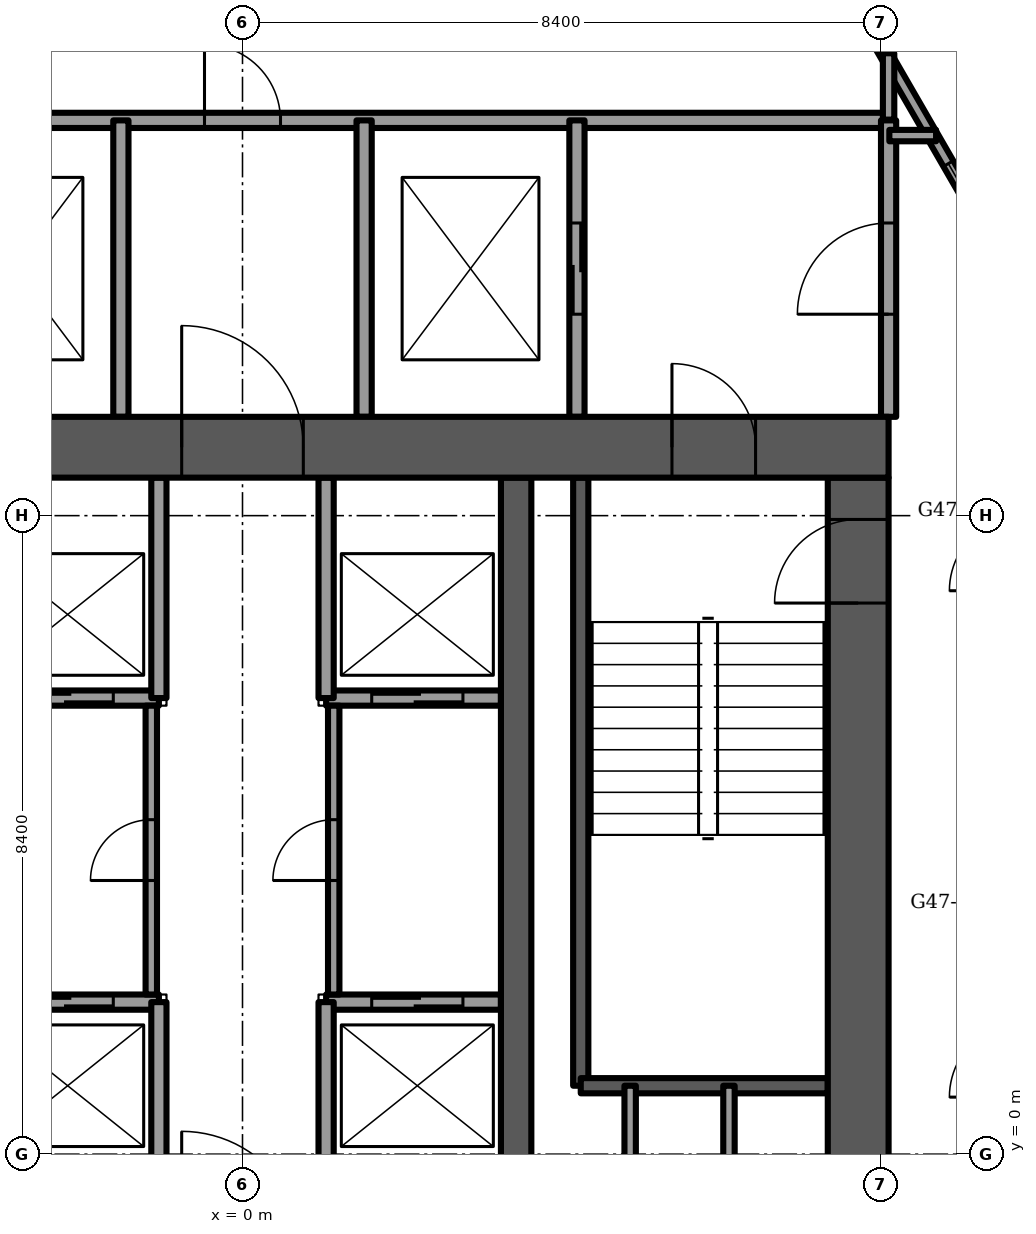
"""IFC4 building model, lengths in metres.
Left out: names, types, materials, properties, quantities, classifications, styles, units other than length and angle.
Written with IfcOpenShell. Run it as: python <this file> out.ifc"""

import sys

from ifc_helpers import new_model, si_unit, direction, frame, frame_2d, origin, place, context, subcontext, project, spatial, rectangle, extrude, element, fill, save


model = new_model("IFC4")
c1 = context("Model", 3, precision=1e-05, world=origin(), true_north=direction((0.0, 1.0)))
c2 = subcontext(c1, "Body", "Model", "MODEL_VIEW")
j1 = project(units=[si_unit("LENGTHUNIT", "METRE"), si_unit("PLANEANGLEUNIT", "RADIAN")], contexts=[c1])
p1 = place(None, origin())
s1 = spatial("IfcSite", under=j1, at=p1, CompositionType="ELEMENT")
p2 = place(p1, origin())
s2 = spatial("IfcBuilding", under=s1, at=p2, CompositionType="ELEMENT")
p3 = place(p2, frame((0.0, 0.0, 190.75)))
s3 = spatial("IfcBuildingStorey", under=s2, at=p3, CompositionType="ELEMENT", Elevation=190.75)
p4 = place(p3, frame((-8.5, 9.3, -0.3), z_axis=(0.0, 0.0, 1.0), x_axis=(1.0, 0.0, 0.0)))
e1 = element("IfcWall", 1, at=p4, inside=s3, PredefinedType="SHEAR", context=c2, shape_type="SweptSolid", body=[
    extrude(rectangle(XDim=17.0, YDim=0.8, at=frame_2d((8.5, 0.0))), origin(), (0.0, 0.0, 1.0), 3.75),
])
p5 = place(p4, frame((7.7, 0.0, 0.0)))
e2 = element("IfcOpeningElement", 2, at=p5, cuts=e1, PredefinedType="OPENING", context=c2, shape_type="SweptSolid", body=[
    extrude(rectangle(XDim=1.6, YDim=2.1, at=frame_2d((0.8, 1.05))), frame((0.0, 0.4, 0.0), z_axis=(0.0, -1.0, 0.0), x_axis=(1.0, 0.0, 0.0)), (0.0, 0.0, 1.0), 0.8),
])
p6 = place(p4, frame((1.75, 0.0, 0.0)))
e3 = element("IfcOpeningElement", 3, at=p6, cuts=e1, PredefinedType="OPENING", context=c2, shape_type="SweptSolid", body=[
    extrude(rectangle(XDim=1.1, YDim=2.1, at=frame_2d((0.55, 1.05))), frame((0.0, 0.4, 0.0), z_axis=(0.0, -1.0, 0.0), x_axis=(1.0, 0.0, 0.0)), (0.0, 0.0, 1.0), 0.8),
])
p7 = place(p4, frame((14.15, 0.0, 0.0)))
e4 = element("IfcOpeningElement", 4, at=p7, cuts=e1, PredefinedType="OPENING", context=c2, shape_type="SweptSolid", body=[
    extrude(rectangle(XDim=1.1, YDim=2.1, at=frame_2d((0.55, 1.05))), frame((0.0, 0.4, 0.0), z_axis=(0.0, -1.0, 0.0), x_axis=(1.0, 0.0, 0.0)), (0.0, 0.0, 1.0), 0.8),
])
p8 = place(p3, frame((8.1, -0.9, -0.3), z_axis=(0.0, 0.0, 1.0), x_axis=(0.0, 1.0, 0.0)))
e5 = element("IfcWall", 5, at=p8, inside=s3, PredefinedType="SHEAR", context=c2, shape_type="SweptSolid", body=[
    extrude(rectangle(XDim=9.8, YDim=0.8, at=frame_2d((4.9, 0.0))), origin(), (0.0, 0.0, 1.0), 3.75),
])
p9 = place(p8, frame((8.15, 0.0, 0.0)))
e6 = element("IfcOpeningElement", 6, at=p9, cuts=e5, PredefinedType="OPENING", context=c2, shape_type="SweptSolid", body=[
    extrude(rectangle(XDim=1.1, YDim=2.1, at=frame_2d((0.55, 1.05))), frame((0.0, 0.4, 0.0), z_axis=(0.0, -1.0, 0.0), x_axis=(1.0, 0.0, 0.0)), (0.0, 0.0, 1.0), 0.8),
])
p10 = place(p3, frame((3.6, -0.9, -0.3), z_axis=(0.0, 0.0, 1.0), x_axis=(0.0, 1.0, 0.0)))
e7 = element("IfcWall", 7, at=p10, inside=s3, PredefinedType="SHEAR", context=c2, shape_type="SweptSolid", body=[
    extrude(rectangle(XDim=9.8, YDim=0.4, at=frame_2d((4.9, 0.0))), origin(), (0.0, 0.0, 1.0), 3.75),
])
p11 = place(p3, frame((17.003, -0.335, 0.0), z_axis=(0.0, 0.0, 1.0), x_axis=(-0.50000659594, 0.866021595583, 0.0)))
e8 = element("IfcWall", 8, at=p11, inside=s3, PredefinedType="SOLIDWALL", context=c2, shape_type="SweptSolid", body=[
    extrude(rectangle(XDim=20.354, YDim=0.15, at=frame_2d((10.177, 0.0))), origin(), (0.0, 0.0, 1.0), 3.45),
])
p12 = place(p11, frame((1.288, 0.0, 0.15)))
e9 = element("IfcOpeningElement", 9, at=p12, cuts=e8, PredefinedType="OPENING", context=c2, shape_type="SweptSolid", body=[
    extrude(rectangle(XDim=0.9, YDim=2.85, at=frame_2d((0.45, 1.425))), frame((0.0, 0.075, 0.0), z_axis=(0.0, -1.0, 0.0), x_axis=(1.0, 0.0, 0.0)), (0.0, 0.0, 1.0), 0.15),
])
p13 = place(p11, frame((2.892, 0.0, 0.0)))
e10 = element("IfcOpeningElement", 10, at=p13, cuts=e8, PredefinedType="OPENING", context=c2, shape_type="SweptSolid", body=[
    extrude(rectangle(XDim=1.4, YDim=2.4, at=frame_2d((0.7, 1.2))), frame((0.0, 0.075, 0.0), z_axis=(0.0, -1.0, 0.0), x_axis=(1.0, 0.0, 0.0)), (0.0, 0.0, 1.0), 0.15),
])
p14 = place(p11, frame((6.138, 0.0, 0.15)))
e11 = element("IfcOpeningElement", 11, at=p14, cuts=e8, PredefinedType="OPENING", context=c2, shape_type="SweptSolid", body=[
    extrude(rectangle(XDim=0.9, YDim=2.85, at=frame_2d((0.45, 1.425))), frame((0.0, 0.075, 0.0), z_axis=(0.0, -1.0, 0.0), x_axis=(1.0, 0.0, 0.0)), (0.0, 0.0, 1.0), 0.15),
])
p15 = place(p11, frame((7.092, 0.0, 0.15)))
e12 = element("IfcOpeningElement", 12, at=p15, cuts=e8, PredefinedType="OPENING", context=c2, shape_type="SweptSolid", body=[
    extrude(rectangle(XDim=1.4, YDim=2.85, at=frame_2d((0.7, 1.425))), frame((0.0, 0.075, 0.0), z_axis=(0.0, -1.0, 0.0), x_axis=(1.0, 0.0, 0.0)), (0.0, 0.0, 1.0), 0.15),
])
p16 = place(p11, frame((9.092, 0.0, 0.15)))
e13 = element("IfcOpeningElement", 13, at=p16, cuts=e8, PredefinedType="OPENING", context=c2, shape_type="SweptSolid", body=[
    extrude(rectangle(XDim=1.6, YDim=2.85, at=frame_2d((0.8, 1.425))), frame((0.0, 0.075, 0.0), z_axis=(0.0, -1.0, 0.0), x_axis=(1.0, 0.0, 0.0)), (0.0, 0.0, 1.0), 0.15),
])
p17 = place(p11, frame((11.292, 0.0, 0.15)))
e14 = element("IfcOpeningElement", 14, at=p17, cuts=e8, PredefinedType="OPENING", context=c2, shape_type="SweptSolid", body=[
    extrude(rectangle(XDim=1.4, YDim=2.85, at=frame_2d((0.7, 1.425))), frame((0.0, 0.075, 0.0), z_axis=(0.0, -1.0, 0.0), x_axis=(1.0, 0.0, 0.0)), (0.0, 0.0, 1.0), 0.15),
])
p18 = place(p11, frame((13.834, 0.0, 0.15)))
e15 = element("IfcOpeningElement", 15, at=p18, cuts=e8, PredefinedType="OPENING", context=c2, shape_type="SweptSolid", body=[
    extrude(rectangle(XDim=1.6, YDim=2.85, at=frame_2d((0.8, 1.425))), frame((0.0, 0.075, 0.0), z_axis=(0.0, -1.0, 0.0), x_axis=(1.0, 0.0, 0.0)), (0.0, 0.0, 1.0), 0.15),
])
p19 = place(p11, frame((18.023, 0.0, 0.15)))
e16 = element("IfcOpeningElement", 16, at=p19, cuts=e8, PredefinedType="OPENING", context=c2, shape_type="SweptSolid", body=[
    extrude(rectangle(XDim=1.6, YDim=2.73, at=frame_2d((0.8, 1.365))), frame((0.0, 0.075, 0.0), z_axis=(0.0, -1.0, 0.0), x_axis=(1.0, 0.0, 0.0)), (0.0, 0.0, 1.0), 0.15),
])
p20 = place(p3, frame((-3.4, 2.0, 0.0), z_axis=(0.0, 0.0, 1.0), x_axis=(1.0, 0.0, 0.0)))
e17 = element("IfcWall", 17, at=p20, inside=s3, PredefinedType="PARTITIONING", context=c2, shape_type="SweptSolid", body=[
    extrude(rectangle(XDim=2.3, YDim=0.2, at=frame_2d((1.15, 0.0))), origin(), (0.0, 0.0, 1.0), 3.45),
])
p21 = place(p20, frame((0.5, 0.0, 0.0)))
e18 = element("IfcOpeningElement", 18, at=p21, cuts=e17, PredefinedType="OPENING", context=c2, shape_type="SweptSolid", body=[
    extrude(rectangle(XDim=1.2, YDim=2.1, at=frame_2d((0.6, 1.05))), frame((0.0, 0.1, 0.0), z_axis=(0.0, -1.0, 0.0), x_axis=(1.0, 0.0, 0.0)), (0.0, 0.0, 1.0), 0.2),
])
p22 = place(p3, frame((-3.4, 6.0, 0.0), z_axis=(0.0, 0.0, 1.0), x_axis=(1.0, 0.0, 0.0)))
e19 = element("IfcWall", 19, at=p22, inside=s3, PredefinedType="PARTITIONING", context=c2, shape_type="SweptSolid", body=[
    extrude(rectangle(XDim=2.3, YDim=0.2, at=frame_2d((1.15, 0.0))), origin(), (0.0, 0.0, 1.0), 3.45),
])
p23 = place(p22, frame((0.5, 0.0, 0.0)))
e20 = element("IfcOpeningElement", 20, at=p23, cuts=e19, PredefinedType="OPENING", context=c2, shape_type="SweptSolid", body=[
    extrude(rectangle(XDim=1.2, YDim=2.1, at=frame_2d((0.6, 1.05))), frame((0.0, 0.1, 0.0), z_axis=(0.0, -1.0, 0.0), x_axis=(1.0, 0.0, 0.0)), (0.0, 0.0, 1.0), 0.2),
])
p24 = place(p3, frame((1.1, 2.0, 0.0), z_axis=(0.0, 0.0, 1.0), x_axis=(1.0, 0.0, 0.0)))
e21 = element("IfcWall", 21, at=p24, inside=s3, PredefinedType="PARTITIONING", context=c2, shape_type="SweptSolid", body=[
    extrude(rectangle(XDim=2.3, YDim=0.2, at=frame_2d((1.15, 0.0))), origin(), (0.0, 0.0, 1.0), 3.45),
])
p25 = place(p24, frame((0.6, 0.0, 0.0)))
e22 = element("IfcOpeningElement", 22, at=p25, cuts=e21, PredefinedType="OPENING", context=c2, shape_type="SweptSolid", body=[
    extrude(rectangle(XDim=1.2, YDim=2.1, at=frame_2d((0.6, 1.05))), frame((0.0, 0.1, 0.0), z_axis=(0.0, -1.0, 0.0), x_axis=(1.0, 0.0, 0.0)), (0.0, 0.0, 1.0), 0.2),
])
p26 = place(p3, frame((1.1, 6.0, 0.0), z_axis=(0.0, 0.0, 1.0), x_axis=(1.0, 0.0, 0.0)))
e23 = element("IfcWall", 23, at=p26, inside=s3, PredefinedType="PARTITIONING", context=c2, shape_type="SweptSolid", body=[
    extrude(rectangle(XDim=2.3, YDim=0.2, at=frame_2d((1.15, 0.0))), origin(), (0.0, 0.0, 1.0), 3.45),
])
p27 = place(p26, frame((0.6, 0.0, 0.0)))
e24 = element("IfcOpeningElement", 24, at=p27, cuts=e23, PredefinedType="OPENING", context=c2, shape_type="SweptSolid", body=[
    extrude(rectangle(XDim=1.2, YDim=2.1, at=frame_2d((0.6, 1.05))), frame((0.0, 0.1, 0.0), z_axis=(0.0, -1.0, 0.0), x_axis=(1.0, 0.0, 0.0)), (0.0, 0.0, 1.0), 0.2),
])
for number, where, z_axis, x_axis in (
    (25, (-1.1, -0.9, 0.0), (0.0, 0.0, 1.0), (0.0, 1.0, 0.0)),
    (26, (1.1, -0.9, 0.0), (0.0, 0.0, 1.0), (0.0, 1.0, 0.0)),
    (27, (-1.1, 6.0, 0.0), (0.0, 0.0, 1.0), (0.0, 1.0, 0.0)),
    (28, (1.1, 6.0, 0.0), (0.0, 0.0, 1.0), (0.0, 1.0, 0.0)),
):
    element("IfcWall", number, at=place(p3, frame(where, z_axis=z_axis, x_axis=x_axis)), inside=s3, PredefinedType="PARTITIONING", context=c2, shape_type="SweptSolid", body=[
        extrude(rectangle(XDim=2.9, YDim=0.2, at=frame_2d((1.45, 0.0))), origin(), (0.0, 0.0, 1.0), 3.45),
    ])
p28 = place(p3, frame((4.45, 0.9, -0.3), z_axis=(0.0, 0.0, 1.0), x_axis=(0.0, 1.0, 0.0)))
e29 = element("IfcWall", 29, at=p28, inside=s3, PredefinedType="SOLIDWALL", context=c2, shape_type="SweptSolid", body=[
    extrude(rectangle(XDim=8.0, YDim=0.2, at=frame_2d((4.0, 0.0))), origin(), (0.0, 0.0, 1.0), 3.75),
])
p29 = place(p3, frame((4.45, 0.9, -0.3), z_axis=(0.0, 0.0, 1.0), x_axis=(1.0, 0.0, 0.0)))
e30 = element("IfcWall", 30, at=p29, inside=s3, PredefinedType="SOLIDWALL", context=c2, shape_type="SweptSolid", body=[
    extrude(rectangle(XDim=3.25, YDim=0.2, at=frame_2d((1.625, 0.0))), origin(), (0.0, 0.0, 1.0), 3.75),
])
for number, where, z_axis, x_axis in (
    (31, (5.1, -0.9, 0.0), (0.0, 0.0, 1.0), (0.0, 1.0, 0.0)),
    (32, (6.4, -0.9, 0.0), (0.0, 0.0, 1.0), (0.0, 1.0, 0.0)),
):
    element("IfcWall", number, at=place(p3, frame(where, z_axis=z_axis, x_axis=x_axis)), inside=s3, PredefinedType="PARTITIONING", context=c2, shape_type="SweptSolid", body=[
        extrude(rectangle(XDim=1.8, YDim=0.15, at=frame_2d((0.9, 0.0))), origin(), (0.0, 0.0, 1.0), 3.45),
    ])
p30 = place(p3, frame((-8.5, 13.6, 0.0), z_axis=(0.0, 0.0, 1.0), x_axis=(1.0, 0.0, 0.0)))
e33 = element("IfcWall", 33, at=p30, inside=s3, PredefinedType="PARTITIONING", context=c2, shape_type="SweptSolid", body=[
    extrude(rectangle(XDim=17.0, YDim=0.2, at=frame_2d((8.5, 0.0))), origin(), (0.0, 0.0, 1.0), 3.45),
])
p31 = place(p30, frame((8.0, 0.0, 0.0)))
e34 = element("IfcOpeningElement", 34, at=p31, cuts=e33, PredefinedType="OPENING", context=c2, shape_type="SweptSolid", body=[
    extrude(rectangle(XDim=1.0, YDim=2.1, at=frame_2d((0.5, 1.05))), frame((0.0, 0.1, 0.0), z_axis=(0.0, -1.0, 0.0), x_axis=(1.0, 0.0, 0.0)), (0.0, 0.0, 1.0), 0.2),
])
p32 = place(p3, frame((8.5, 9.7, 0.0), z_axis=(0.0, 0.0, 1.0), x_axis=(0.0, 1.0, 0.0)))
e35 = element("IfcWall", 35, at=p32, inside=s3, PredefinedType="PARTITIONING", context=c2, shape_type="SweptSolid", body=[
    extrude(rectangle(XDim=3.9, YDim=0.2, at=frame_2d((1.95, 0.0))), origin(), (0.0, 0.0, 1.0), 3.45),
])
p33 = place(p32, frame((1.35, 0.0, 0.0)))
e36 = element("IfcOpeningElement", 36, at=p33, cuts=e35, PredefinedType="OPENING", context=c2, shape_type="SweptSolid", body=[
    extrude(rectangle(XDim=1.2, YDim=2.1, at=frame_2d((0.6, 1.05))), frame((0.0, 0.1, 0.0), z_axis=(0.0, -1.0, 0.0), x_axis=(1.0, 0.0, 0.0)), (0.0, 0.0, 1.0), 0.2),
])
p34 = place(p3, frame((4.4, 9.7, 0.0), z_axis=(0.0, 0.0, 1.0), x_axis=(0.0, 1.0, 0.0)))
e37 = element("IfcWall", 37, at=p34, inside=s3, PredefinedType="PARTITIONING", context=c2, shape_type="SweptSolid", body=[
    extrude(rectangle(XDim=3.9, YDim=0.2, at=frame_2d((1.95, 0.0))), origin(), (0.0, 0.0, 1.0), 3.45),
])
p35 = place(p34, frame((1.35, 0.0, 0.0)))
e38 = element("IfcOpeningElement", 38, at=p35, cuts=e37, PredefinedType="OPENING", context=c2, shape_type="SweptSolid", body=[
    extrude(rectangle(XDim=1.2, YDim=2.1, at=frame_2d((0.6, 1.05))), frame((0.0, 0.1, 0.0), z_axis=(0.0, -1.0, 0.0), x_axis=(1.0, 0.0, 0.0)), (0.0, 0.0, 1.0), 0.2),
])
for number, where, z_axis, x_axis in (
    (39, (-1.6, 9.7, 0.0), (0.0, 0.0, 1.0), (0.0, 1.0, 0.0)),
    (40, (1.6, 9.7, 0.0), (0.0, 0.0, 1.0), (0.0, 1.0, 0.0)),
):
    element("IfcWall", number, at=place(p3, frame(where, z_axis=z_axis, x_axis=x_axis)), inside=s3, PredefinedType="PARTITIONING", context=c2, shape_type="SweptSolid", body=[
        extrude(rectangle(XDim=3.9, YDim=0.2, at=frame_2d((1.95, 0.0))), origin(), (0.0, 0.0, 1.0), 3.45),
    ])
p36 = place(p3, frame((-1.2, 2.1, 0.0), z_axis=(0.0, 0.0, 1.0), x_axis=(0.0, 1.0, 0.0)))
e41 = element("IfcWall", 41, at=p36, inside=s3, PredefinedType="PARTITIONING", context=c2, shape_type="SweptSolid", body=[
    extrude(rectangle(XDim=3.8, YDim=0.15, at=frame_2d((1.9, 0.0))), origin(), (0.0, 0.0, 1.0), 3.45),
])
p37 = place(p36, frame((1.5, 0.0, 0.0)))
e42 = element("IfcOpeningElement", 42, at=p37, cuts=e41, PredefinedType="OPENING", context=c2, shape_type="SweptSolid", body=[
    extrude(rectangle(XDim=0.8, YDim=2.1, at=frame_2d((0.4, 1.05))), frame((0.0, 0.075, 0.0), z_axis=(0.0, -1.0, 0.0), x_axis=(1.0, 0.0, 0.0)), (0.0, 0.0, 1.0), 0.15),
])
p38 = place(p3, frame((1.2, 2.1, 0.0), z_axis=(0.0, 0.0, 1.0), x_axis=(0.0, 1.0, 0.0)))
e43 = element("IfcWall", 43, at=p38, inside=s3, PredefinedType="PARTITIONING", context=c2, shape_type="SweptSolid", body=[
    extrude(rectangle(XDim=3.8, YDim=0.15, at=frame_2d((1.9, 0.0))), origin(), (0.0, 0.0, 1.0), 3.45),
])
p39 = place(p38, frame((1.5, 0.0, 0.0)))
e44 = element("IfcOpeningElement", 44, at=p39, cuts=e43, PredefinedType="OPENING", context=c2, shape_type="SweptSolid", body=[
    extrude(rectangle(XDim=0.8, YDim=2.1, at=frame_2d((0.4, 1.05))), frame((0.0, 0.075, 0.0), z_axis=(0.0, -1.0, 0.0), x_axis=(1.0, 0.0, 0.0)), (0.0, 0.0, 1.0), 0.15),
])
p40 = place(p3, frame((8.51, 13.4, 0.0), z_axis=(0.0, 0.0, 1.0), x_axis=(1.0, 0.0, 0.0)))
e45 = element("IfcWall", 45, at=p40, inside=s3, PredefinedType="PARTITIONING", context=c2, shape_type="SweptSolid", body=[
    extrude(rectangle(XDim=0.615, YDim=0.15, at=frame_2d((0.308, 0.0))), origin(), (0.0, 0.0, 1.0), 3.45),
])
p41 = place(p3, frame((8.5, 13.61, 0.0), z_axis=(0.0, 0.0, 1.0), x_axis=(0.0, 1.0, 0.0)))
e46 = element("IfcWall", 46, at=p41, inside=s3, PredefinedType="PARTITIONING", context=c2, shape_type="SweptSolid", body=[
    extrude(rectangle(XDim=0.873, YDim=0.15, at=frame_2d((0.437, 0.0))), origin(), (0.0, 0.0, 1.0), 3.45),
])
p42 = place(p18, origin())
e47 = element("IfcWindow", 47, at=p42, inside=s3, PartitioningType="SINGLE_PANEL", PredefinedType="WINDOW", context=c2, shape_type="SweptSolid", body=[
    extrude(rectangle(XDim=1.6, YDim=2.85, at=frame_2d((0.8, 1.425))), frame((0.0, 0.03, 0.0), z_axis=(0.0, -1.0, 0.0), x_axis=(1.0, 0.0, 0.0)), (0.0, 0.0, 1.0), 0.06),
])
fill(e15, e47)
p43 = place(p21, origin())
e48 = element("IfcDoor", 48, at=p43, inside=s3, OperationType="SLIDING_TO_LEFT", PredefinedType="DOOR", context=c2, shape_type="SweptSolid", body=[
    extrude(rectangle(XDim=1.2, YDim=2.1, at=frame_2d((0.6, 1.05))), frame((0.0, 0.025, 0.0), z_axis=(0.0, -1.0, 0.0), x_axis=(1.0, 0.0, 0.0)), (0.0, 0.0, 1.0), 0.05),
])
fill(e18, e48)
p44 = place(p25, origin())
e49 = element("IfcDoor", 49, at=p44, inside=s3, OperationType="SLIDING_TO_LEFT", PredefinedType="DOOR", context=c2, shape_type="SweptSolid", body=[
    extrude(rectangle(XDim=1.2, YDim=2.1, at=frame_2d((0.6, 1.05))), frame((0.0, 0.025, 0.0), z_axis=(0.0, -1.0, 0.0), x_axis=(1.0, 0.0, 0.0)), (0.0, 0.0, 1.0), 0.05),
])
fill(e22, e49)
p45 = place(p23, origin())
e50 = element("IfcDoor", 50, at=p45, inside=s3, OperationType="SLIDING_TO_LEFT", PredefinedType="DOOR", context=c2, shape_type="SweptSolid", body=[
    extrude(rectangle(XDim=1.2, YDim=2.1, at=frame_2d((0.6, 1.05))), frame((0.0, 0.025, 0.0), z_axis=(0.0, -1.0, 0.0), x_axis=(1.0, 0.0, 0.0)), (0.0, 0.0, 1.0), 0.05),
])
fill(e20, e50)
p46 = place(p27, origin())
e51 = element("IfcDoor", 51, at=p46, inside=s3, OperationType="SLIDING_TO_LEFT", PredefinedType="DOOR", context=c2, shape_type="SweptSolid", body=[
    extrude(rectangle(XDim=1.2, YDim=2.1, at=frame_2d((0.6, 1.05))), frame((0.0, 0.025, 0.0), z_axis=(0.0, -1.0, 0.0), x_axis=(1.0, 0.0, 0.0)), (0.0, 0.0, 1.0), 0.05),
])
fill(e24, e51)
p47 = place(p5, origin())
e52 = element("IfcDoor", 52, at=p47, inside=s3, OperationType="DOUBLE_DOOR_SINGLE_SWING", PredefinedType="DOOR", context=c2, shape_type="SweptSolid", body=[
    extrude(rectangle(XDim=1.6, YDim=2.1, at=frame_2d((0.8, 1.05))), frame((0.0, 0.025, 0.0), z_axis=(0.0, -1.0, 0.0), x_axis=(1.0, 0.0, 0.0)), (0.0, 0.0, 1.0), 0.05),
])
fill(e2, e52)
p48 = place(p7, origin())
e53 = element("IfcDoor", 53, at=p48, inside=s3, OperationType="SINGLE_SWING_RIGHT", PredefinedType="DOOR", context=c2, shape_type="SweptSolid", body=[
    extrude(rectangle(XDim=1.1, YDim=2.1, at=frame_2d((0.55, 1.05))), frame((0.0, 0.025, 0.0), z_axis=(0.0, -1.0, 0.0), x_axis=(1.0, 0.0, 0.0)), (0.0, 0.0, 1.0), 0.05),
])
fill(e4, e53)
p49 = place(p9, origin())
e54 = element("IfcDoor", 54, at=p49, inside=s3, OperationType="SINGLE_SWING_LEFT", PredefinedType="DOOR", context=c2, shape_type="SweptSolid", body=[
    extrude(rectangle(XDim=1.1, YDim=2.1, at=frame_2d((0.55, 1.05))), frame((0.0, 0.025, 0.0), z_axis=(0.0, -1.0, 0.0), x_axis=(1.0, 0.0, 0.0)), (0.0, 0.0, 1.0), 0.05),
])
fill(e6, e54)
p50 = place(p35, origin())
e55 = element("IfcDoor", 55, at=p50, inside=s3, OperationType="SLIDING_TO_LEFT", PredefinedType="DOOR", context=c2, shape_type="SweptSolid", body=[
    extrude(rectangle(XDim=1.2, YDim=2.1, at=frame_2d((0.6, 1.05))), frame((0.0, 0.025, 0.0), z_axis=(0.0, -1.0, 0.0), x_axis=(1.0, 0.0, 0.0)), (0.0, 0.0, 1.0), 0.05),
])
fill(e38, e55)
p51 = place(p33, origin())
e56 = element("IfcDoor", 56, at=p51, inside=s3, OperationType="SINGLE_SWING_LEFT", PredefinedType="DOOR", context=c2, shape_type="SweptSolid", body=[
    extrude(rectangle(XDim=1.2, YDim=2.1, at=frame_2d((0.6, 1.05))), frame((0.0, 0.025, 0.0), z_axis=(0.0, -1.0, 0.0), x_axis=(1.0, 0.0, 0.0)), (0.0, 0.0, 1.0), 0.05),
])
fill(e36, e56)
p52 = place(p31, origin())
e57 = element("IfcDoor", 57, at=p52, inside=s3, OperationType="SINGLE_SWING_LEFT", PredefinedType="DOOR", context=c2, shape_type="SweptSolid", body=[
    extrude(rectangle(XDim=1.0, YDim=2.1, at=frame_2d((0.5, 1.05))), frame((0.0, 0.025, 0.0), z_axis=(0.0, -1.0, 0.0), x_axis=(1.0, 0.0, 0.0)), (0.0, 0.0, 1.0), 0.05),
])
fill(e34, e57)
p53 = place(p37, origin())
e58 = element("IfcDoor", 58, at=p53, inside=s3, OperationType="SINGLE_SWING_LEFT", PredefinedType="DOOR", context=c2, shape_type="SweptSolid", body=[
    extrude(rectangle(XDim=0.8, YDim=2.1, at=frame_2d((0.4, 1.05))), frame((0.0, 0.025, 0.0), z_axis=(0.0, -1.0, 0.0), x_axis=(1.0, 0.0, 0.0)), (0.0, 0.0, 1.0), 0.05),
])
fill(e42, e58)
p54 = place(p39, origin())
e59 = element("IfcDoor", 59, at=p54, inside=s3, OperationType="SINGLE_SWING_RIGHT", PredefinedType="DOOR", context=c2, shape_type="SweptSolid", body=[
    extrude(rectangle(XDim=0.8, YDim=2.1, at=frame_2d((0.4, 1.05))), frame((0.0, 0.025, 0.0), z_axis=(0.0, -1.0, 0.0), x_axis=(1.0, 0.0, 0.0)), (0.0, 0.0, 1.0), 0.05),
])
fill(e44, e59)
save(model, sys.argv[1])
